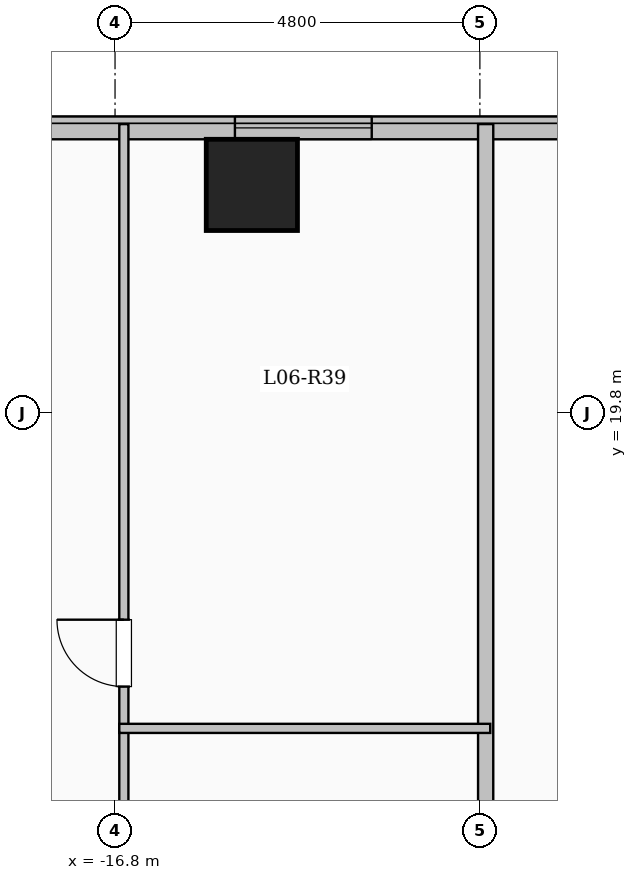
"""IFC4 building model, lengths in metres.
Left out: names, types, materials, properties, quantities, classifications, styles, units other than length and angle.
Written with IfcOpenShell. Run it as: python <this file> out.ifc"""

import sys

from ifc_helpers import new_model, si_unit, direction, frame, frame_2d, origin, origin_2d, place, context, subcontext, project, spatial, rectangle, extrude, element, fill, save


model = new_model("IFC4")
c1 = context("Model", 3, precision=1e-05, world=origin(), true_north=direction((0.0, 1.0)))
c2 = subcontext(c1, "Body", "Model", "MODEL_VIEW")
j1 = project(units=[si_unit("LENGTHUNIT", "METRE"), si_unit("PLANEANGLEUNIT", "RADIAN")], contexts=[c1])
p1 = place(None, origin())
s1 = spatial("IfcSite", under=j1, at=p1, CompositionType="ELEMENT")
p2 = place(p1, origin())
s2 = spatial("IfcBuilding", under=s1, at=p2, CompositionType="ELEMENT")
p3 = place(p2, frame((0.0, 0.0, 27.35)))
s3 = spatial("IfcBuildingStorey", under=s2, at=p3, CompositionType="ELEMENT", Elevation=27.35)
p4 = place(p3, frame((-15.0, 22.8, 0.0), z_axis=(0.0, 0.0, 1.0), x_axis=(1.0, 0.0, 0.0)))
e1 = element("IfcColumn", 1, at=p4, inside=s3, PredefinedType="COLUMN", context=c2, shape_type="SweptSolid", body=[
    extrude(rectangle(XDim=1.2, YDim=1.2, at=origin_2d()), origin(), (0.0, 0.0, 1.0), 3.35),
])
p5 = place(p3, frame((-22.65, 23.55, 0.0), z_axis=(0.0, 0.0, 1.0), x_axis=(1.0, 0.0, 0.0)))
e2 = element("IfcWall", 2, at=p5, inside=s3, PredefinedType="SOLIDWALL", context=c2, shape_type="SweptSolid", body=[
    extrude(rectangle(XDim=15.3, YDim=0.3, at=frame_2d((7.65, 0.0))), origin(), (0.0, 0.0, 1.0), 3.1),
])
p6 = place(p5, frame((1.81, 0.0, 0.9)))
e3 = element("IfcOpeningElement", 3, at=p6, cuts=e2, PredefinedType="OPENING", context=c2, shape_type="SweptSolid", body=[
    extrude(rectangle(XDim=2.4, YDim=1.8, at=frame_2d((1.2, 0.9))), frame((0.0, 0.16, 0.0), z_axis=(0.0, -1.0, 0.0), x_axis=(1.0, 0.0, 0.0)), (0.0, 0.0, 1.0), 0.32),
])
p7 = place(p5, frame((7.427, 0.0, 0.9)))
e4 = element("IfcOpeningElement", 4, at=p7, cuts=e2, PredefinedType="OPENING", context=c2, shape_type="SweptSolid", body=[
    extrude(rectangle(XDim=1.8, YDim=1.65, at=frame_2d((0.9, 0.825))), frame((0.0, 0.16, 0.0), z_axis=(0.0, -1.0, 0.0), x_axis=(1.0, 0.0, 0.0)), (0.0, 0.0, 1.0), 0.32),
])
p8 = place(p5, frame((11.868, 0.0, 0.9)))
e5 = element("IfcOpeningElement", 5, at=p8, cuts=e2, PredefinedType="OPENING", context=c2, shape_type="SweptSolid", body=[
    extrude(rectangle(XDim=2.4, YDim=1.8, at=frame_2d((1.2, 0.9))), frame((0.0, 0.16, 0.0), z_axis=(0.0, -1.0, 0.0), x_axis=(1.0, 0.0, 0.0)), (0.0, 0.0, 1.0), 0.32),
])
p9 = place(p3, frame((-11.924, 12.5, 0.0), z_axis=(0.0, 0.0, 1.0), x_axis=(0.0, 1.0, 0.0)))
e6 = element("IfcWall", 6, at=p9, inside=s3, PredefinedType="SOLIDWALL", context=c2, shape_type="SweptSolid", body=[
    extrude(rectangle(XDim=11.1, YDim=0.2, at=frame_2d((5.55, 0.0))), origin(), (0.0, 0.0, 1.0), 3.1),
])
p10 = place(p3, frame((-16.684, 12.44, 0.0), z_axis=(0.0, 0.0, 1.0), x_axis=(0.0, 1.0, 0.0)))
e7 = element("IfcWall", 7, at=p10, inside=s3, PredefinedType="PARTITIONING", context=c2, shape_type="SweptSolid", body=[
    extrude(rectangle(XDim=3.21, YDim=0.12, at=frame_2d((1.605, 0.0))), origin(), (0.0, 0.0, 1.0), 3.1),
])
p11 = place(p10, frame((1.195, 0.0, 0.0)))
e8 = element("IfcOpeningElement", 8, at=p11, cuts=e7, PredefinedType="OPENING", context=c2, shape_type="SweptSolid", body=[
    extrude(rectangle(XDim=0.88, YDim=2.1, at=frame_2d((0.44, 1.05))), frame((0.0, 0.07, 0.0), z_axis=(0.0, -1.0, 0.0), x_axis=(1.0, 0.0, 0.0)), (0.0, 0.0, 1.0), 0.14),
])
p12 = place(p3, frame((-16.684, 15.65, 0.0), z_axis=(0.0, 0.0, 1.0), x_axis=(0.0, 1.0, 0.0)))
e9 = element("IfcWall", 9, at=p12, inside=s3, PredefinedType="PARTITIONING", context=c2, shape_type="SweptSolid", body=[
    extrude(rectangle(XDim=7.95, YDim=0.12, at=frame_2d((3.975, 0.0))), origin(), (0.0, 0.0, 1.0), 3.1),
])
p13 = place(p12, frame((0.55, 0.0, 0.0)))
e10 = element("IfcOpeningElement", 10, at=p13, cuts=e9, PredefinedType="OPENING", context=c2, shape_type="SweptSolid", body=[
    extrude(rectangle(XDim=0.88, YDim=2.1, at=frame_2d((0.44, 1.05))), frame((0.0, 0.07, 0.0), z_axis=(0.0, -1.0, 0.0), x_axis=(1.0, 0.0, 0.0)), (0.0, 0.0, 1.0), 0.14),
])
p14 = place(p3, frame((-16.744, 15.65, 0.0), z_axis=(0.0, 0.0, 1.0), x_axis=(1.0, 0.0, 0.0)))
e11 = element("IfcWall", 11, at=p14, inside=s3, PredefinedType="PARTITIONING", context=c2, shape_type="SweptSolid", body=[
    extrude(rectangle(XDim=4.88, YDim=0.12, at=frame_2d((2.44, 0.0))), origin(), (0.0, 0.0, 1.0), 3.1),
])
p15 = place(p7, origin())
e12 = element("IfcWindow", 12, at=p15, inside=s3, PartitioningType="SINGLE_PANEL", PredefinedType="WINDOW", context=c2, shape_type="SweptSolid", body=[
    extrude(rectangle(XDim=1.8, YDim=1.65, at=frame_2d((0.9, 0.825))), frame((0.0, 0.03, 0.0), z_axis=(0.0, -1.0, 0.0), x_axis=(1.0, 0.0, 0.0)), (0.0, 0.0, 1.0), 0.06),
])
fill(e4, e12)
p16 = place(p13, origin())
e13 = element("IfcDoor", 13, at=p16, inside=s3, OperationType="SINGLE_SWING_RIGHT", PredefinedType="DOOR", context=c2, shape_type="SweptSolid", body=[
    extrude(rectangle(XDim=0.88, YDim=2.1, at=frame_2d((0.44, 1.05))), frame((0.0, 0.025, 0.0), z_axis=(0.0, -1.0, 0.0), x_axis=(1.0, 0.0, 0.0)), (0.0, 0.0, 1.0), 0.05),
])
fill(e10, e13)
save(model, sys.argv[1])
